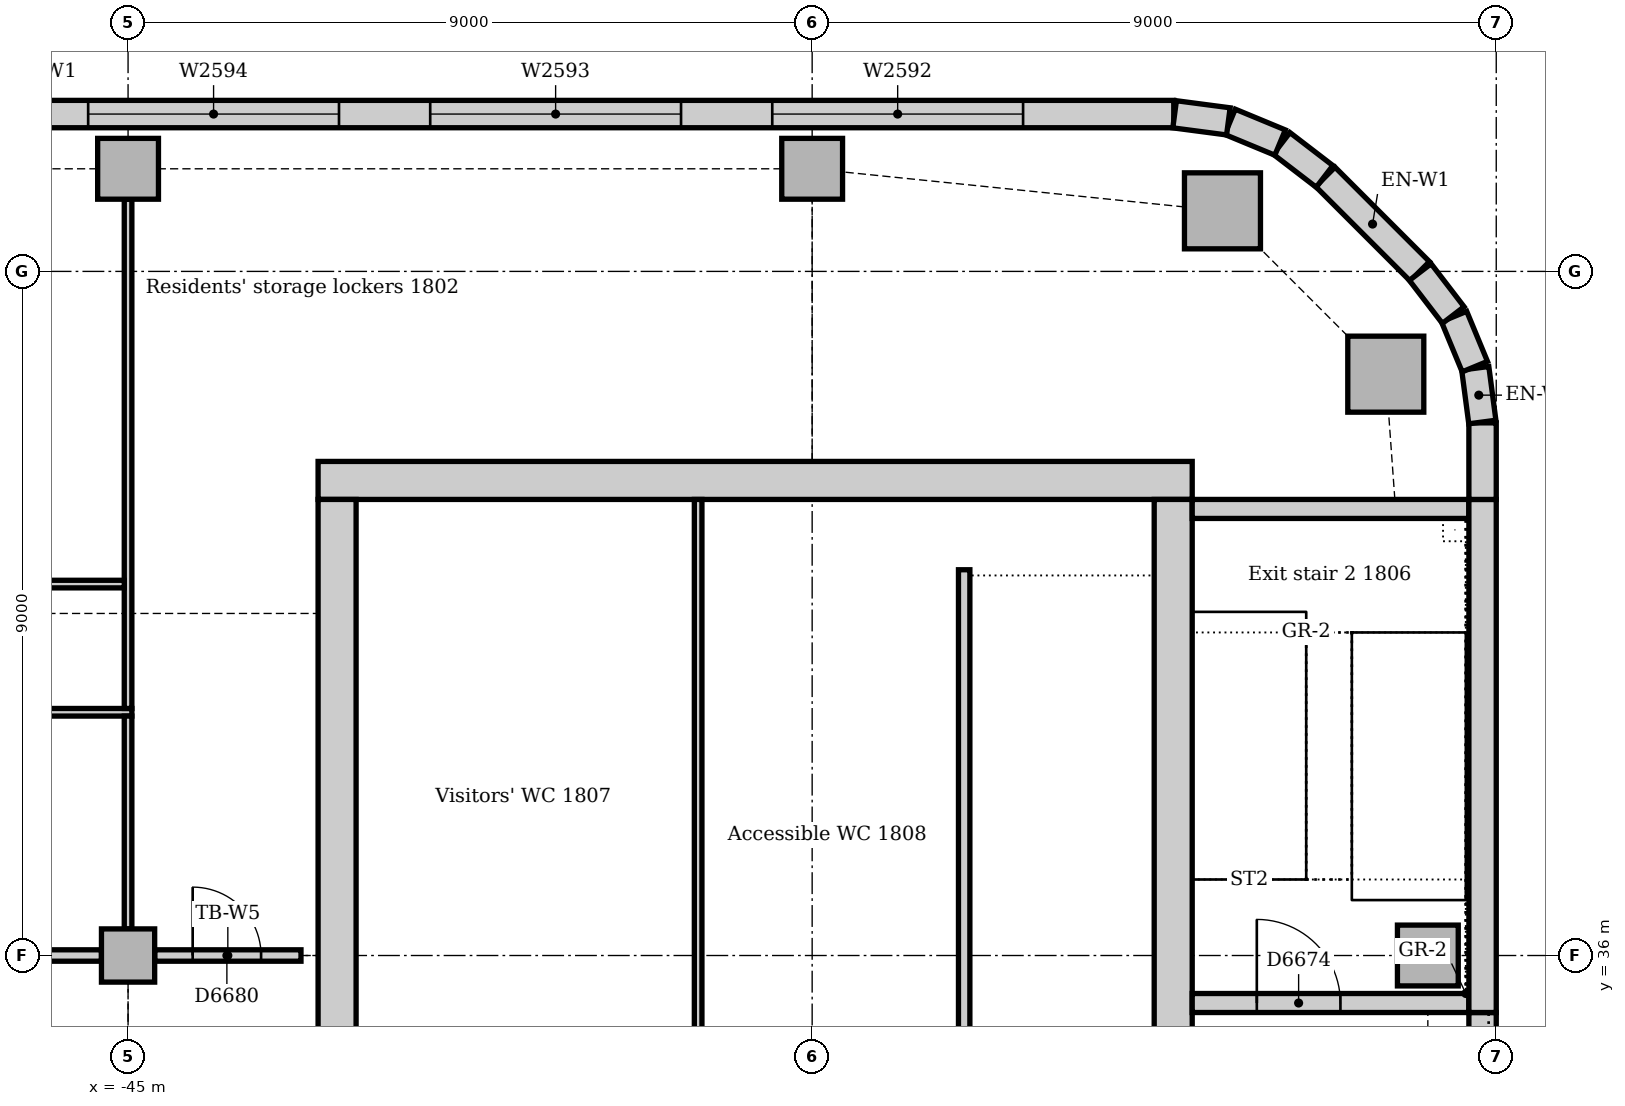
"""IFC4 building model, lengths in metres.
Left out: names, types, materials, properties, quantities, classifications, styles, units other than length and angle.
Written with IfcOpenShell. Run it as: python <this file> out.ifc"""

import sys

from ifc_helpers import new_model, si_unit, direction, frame, frame_2d, origin, origin_2d, place, context, subcontext, project, spatial, rectangle, extrude, element, fill, save


model = new_model("IFC4")
c1 = context("Model", 3, precision=1e-05, world=origin(), true_north=direction((0.0, 1.0)))
c2 = subcontext(c1, "Body", "Model", "MODEL_VIEW")
j1 = project(units=[si_unit("LENGTHUNIT", "METRE"), si_unit("PLANEANGLEUNIT", "RADIAN")], contexts=[c1])
p1 = place(None, origin())
s1 = spatial("IfcSite", under=j1, at=p1, CompositionType="ELEMENT")
p2 = place(p1, origin())
s2 = spatial("IfcBuilding", under=s1, at=p2, CompositionType="ELEMENT")
p3 = place(p2, frame((0.0, 0.0, 79.0)))
s3 = spatial("IfcBuildingStorey", under=s2, at=p3, CompositionType="ELEMENT", Elevation=79.0)
p4 = place(p3, frame((-31.0, 42.25, 0.0), z_axis=(0.0, 0.0, 1.0), x_axis=(-1.0, 0.0, 0.0)))
e1 = element("IfcWall", 1, at=p4, inside=s3, PredefinedType="SOLIDWALL", context=c2, shape_type="SweptSolid", body=[
    extrude(rectangle(XDim=11.5, YDim=0.5, at=frame_2d((5.75, 0.0))), origin(), (0.0, 0.0, 1.0), 4.0),
])
p5 = place(p3, frame((-31.25, 30.5, 0.0), z_axis=(0.0, 0.0, 1.0), x_axis=(0.0, 1.0, 0.0)))
e2 = element("IfcWall", 2, at=p5, inside=s3, PredefinedType="SOLIDWALL", context=c2, shape_type="SweptSolid", body=[
    extrude(rectangle(XDim=11.5, YDim=0.5, at=frame_2d((5.75, 0.0))), origin(), (0.0, 0.0, 1.0), 4.0),
])
p6 = place(p5, frame((0.85, 0.0, 0.0)))
e3 = element("IfcOpeningElement", 3, at=p6, cuts=e2, PredefinedType="OPENING", context=c2, shape_type="SweptSolid", body=[
    extrude(rectangle(XDim=1.8, YDim=2.1, at=frame_2d((0.9, 1.05))), frame((0.0, 0.26, 0.0), z_axis=(0.0, -1.0, 0.0), x_axis=(1.0, 0.0, 0.0)), (0.0, 0.0, 1.0), 0.52),
])
p7 = place(p3, frame((-42.25, 42.0, 0.0), z_axis=(0.0, 0.0, 1.0), x_axis=(0.0, -1.0, 0.0)))
e4 = element("IfcWall", 4, at=p7, inside=s3, PredefinedType="SOLIDWALL", context=c2, shape_type="SweptSolid", body=[
    extrude(rectangle(XDim=11.5, YDim=0.5, at=frame_2d((5.75, 0.0))), origin(), (0.0, 0.0, 1.0), 4.0),
])
p8 = place(p7, frame((8.85, 0.0, 0.0)))
e5 = element("IfcOpeningElement", 5, at=p8, cuts=e4, PredefinedType="OPENING", context=c2, shape_type="SweptSolid", body=[
    extrude(rectangle(XDim=1.8, YDim=2.1, at=frame_2d((0.9, 1.05))), frame((0.0, 0.26, 0.0), z_axis=(0.0, -1.0, 0.0), x_axis=(1.0, 0.0, 0.0)), (0.0, 0.0, 1.0), 0.52),
])
p9 = place(p3, frame((-31.0, 35.375, 0.0), z_axis=(0.0, 0.0, 1.0), x_axis=(1.0, 0.0, 0.0)))
e6 = element("IfcWall", 6, at=p9, inside=s3, PredefinedType="SOLIDWALL", context=c2, shape_type="SweptSolid", body=[
    extrude(rectangle(XDim=3.64, YDim=0.25, at=frame_2d((1.82, 0.0))), origin(), (0.0, 0.0, 1.0), 4.0),
])
p10 = place(p9, frame((0.85, 0.0, 0.0)))
e7 = element("IfcOpeningElement", 7, at=p10, cuts=e6, PredefinedType="OPENING", context=c2, shape_type="SweptSolid", body=[
    extrude(rectangle(XDim=1.1, YDim=2.1, at=frame_2d((0.55, 1.05))), frame((0.0, 0.135, 0.0), z_axis=(0.0, -1.0, 0.0), x_axis=(1.0, 0.0, 0.0)), (0.0, 0.0, 1.0), 0.27),
])
p11 = place(p3, frame((-27.36, 41.875, 0.0), z_axis=(0.0, 0.0, 1.0), x_axis=(-1.0, 0.0, 0.0)))
e8 = element("IfcWall", 8, at=p11, inside=s3, PredefinedType="SOLIDWALL", context=c2, shape_type="SweptSolid", body=[
    extrude(rectangle(XDim=3.64, YDim=0.25, at=frame_2d((1.82, 0.0))), origin(), (0.0, 0.0, 1.0), 4.0),
])
for number, where, z_axis, x_axis in (
    (9, (-28.453, 43.648, 0.0), (0.0, 0.0, 1.0), (1.0, 0.0, 0.0)),
    (10, (-30.602, 45.797, 0.0), (0.0, 0.0, 1.0), (1.0, 0.0, 0.0)),
):
    element("IfcColumn", number, at=place(p3, frame(where, z_axis=z_axis, x_axis=x_axis)), inside=s3, PredefinedType="COLUMN", context=c2, shape_type="SweptSolid", body=[
        extrude(rectangle(XDim=1.0, YDim=1.0, at=origin_2d()), origin(), (0.0, 0.0, 1.0), 3.85),
    ])
p12 = place(p3, frame((-27.9, 36.0, 0.0), z_axis=(0.0, 0.0, 1.0), x_axis=(1.0, 0.0, 0.0)))
e11 = element("IfcColumn", 11, at=p12, inside=s3, PredefinedType="COLUMN", context=c2, shape_type="SweptSolid", body=[
    extrude(rectangle(XDim=0.8, YDim=0.8, at=origin_2d()), origin(), (0.0, 0.0, 1.0), 4.0),
])
for number, where, z_axis, x_axis in (
    (12, (-45.0, 46.35, 0.0), (0.0, 0.0, 1.0), (1.0, 0.0, 0.0)),
    (13, (-36.0, 46.35, 0.0), (0.0, 0.0, 1.0), (1.0, 0.0, 0.0)),
):
    element("IfcColumn", number, at=place(p3, frame(where, z_axis=z_axis, x_axis=x_axis)), inside=s3, PredefinedType="COLUMN", context=c2, shape_type="SweptSolid", body=[
        extrude(rectangle(XDim=0.8, YDim=0.8, at=origin_2d()), origin(), (0.0, 0.0, 1.0), 3.85),
    ])
p13 = place(p3, frame((-45.0, 36.0, 0.0), z_axis=(0.0, 0.0, 1.0), x_axis=(1.0, 0.0, 0.0)))
e14 = element("IfcColumn", 14, at=p13, inside=s3, PredefinedType="COLUMN", context=c2, shape_type="SweptSolid", body=[
    extrude(rectangle(XDim=0.7, YDim=0.7, at=origin_2d()), origin(), (0.0, 0.0, 1.0), 3.85),
])
p14 = place(p3, frame((-27.18, 27.75, 0.0), z_axis=(0.0, 0.0, 1.0), x_axis=(0.0, 1.0, 0.0)))
e15 = element("IfcWall", 15, at=p14, inside=s3, PredefinedType="STANDARD", context=c2, shape_type="SweptSolid", body=[
    extrude(rectangle(XDim=7.5, YDim=0.36, at=frame_2d((3.75, 0.0))), origin(), (0.0, 0.0, 1.0), 3.85),
])
p15 = place(p14, frame((2.85, 0.0, 1.2)))
e16 = element("IfcOpeningElement", 16, at=p15, cuts=e15, PredefinedType="OPENING", context=c2, shape_type="SweptSolid", body=[
    extrude(rectangle(XDim=1.8, YDim=1.2, at=frame_2d((0.9, 0.6))), frame((0.0, 0.19, 0.0), z_axis=(0.0, -1.0, 0.0), x_axis=(1.0, 0.0, 0.0)), (0.0, 0.0, 1.0), 0.38),
])
p16 = place(p3, frame((-27.18, 35.25, 0.0), z_axis=(0.0, 0.0, 1.0), x_axis=(0.0, 1.0, 0.0)))
e17 = element("IfcWall", 17, at=p16, inside=s3, PredefinedType="STANDARD", context=c2, shape_type="SweptSolid", body=[
    extrude(rectangle(XDim=6.75, YDim=0.36, at=frame_2d((3.375, 0.0))), origin(), (0.0, 0.0, 1.0), 3.85),
])
p17 = place(p3, frame((-27.18, 42.0, 0.0), z_axis=(0.0, 0.0, 1.0), x_axis=(0.0, 1.0, 0.0)))
e18 = element("IfcWall", 18, at=p17, inside=s3, PredefinedType="STANDARD", context=c2, shape_type="SweptSolid", body=[
    extrude(rectangle(XDim=1.007, YDim=0.36, at=frame_2d((0.504, 0.0))), origin(), (0.0, 0.0, 1.0), 3.85),
])
p18 = place(p3, frame((-28.006, 45.001, 0.0), z_axis=(0.0, 0.0, 1.0), x_axis=(-0.707106781187, 0.707106781187, 0.0)))
e19 = element("IfcWall", 19, at=p18, inside=s3, PredefinedType="STANDARD", context=c2, shape_type="SweptSolid", body=[
    extrude(rectangle(XDim=1.757, YDim=0.36, at=frame_2d((0.879, 0.0))), origin(), (0.0, 0.0, 1.0), 3.85),
])
p19 = place(p3, frame((-31.243, 47.07, 0.0), z_axis=(0.0, 0.0, 1.0), x_axis=(-1.0, 0.0, 0.0)))
e20 = element("IfcWall", 20, at=p19, inside=s3, PredefinedType="STANDARD", context=c2, shape_type="SweptSolid", body=[
    extrude(rectangle(XDim=29.765, YDim=0.36, at=frame_2d((14.882, 0.0))), origin(), (0.0, 0.0, 1.0), 3.85),
])
p20 = place(p19, frame((1.982, 0.0, 0.9)))
e21 = element("IfcOpeningElement", 21, at=p20, cuts=e20, PredefinedType="OPENING", context=c2, shape_type="SweptSolid", body=[
    extrude(rectangle(XDim=3.3, YDim=1.6, at=frame_2d((1.65, 0.8))), frame((0.0, 0.19, 0.0), z_axis=(0.0, -1.0, 0.0), x_axis=(1.0, 0.0, 0.0)), (0.0, 0.0, 1.0), 0.38),
])
p21 = place(p19, frame((6.482, 0.0, 0.9)))
e22 = element("IfcOpeningElement", 22, at=p21, cuts=e20, PredefinedType="OPENING", context=c2, shape_type="SweptSolid", body=[
    extrude(rectangle(XDim=3.3, YDim=1.6, at=frame_2d((1.65, 0.8))), frame((0.0, 0.19, 0.0), z_axis=(0.0, -1.0, 0.0), x_axis=(1.0, 0.0, 0.0)), (0.0, 0.0, 1.0), 0.38),
])
p22 = place(p19, frame((10.982, 0.0, 0.9)))
e23 = element("IfcOpeningElement", 23, at=p22, cuts=e20, PredefinedType="OPENING", context=c2, shape_type="SweptSolid", body=[
    extrude(rectangle(XDim=3.3, YDim=1.6, at=frame_2d((1.65, 0.8))), frame((0.0, 0.19, 0.0), z_axis=(0.0, -1.0, 0.0), x_axis=(1.0, 0.0, 0.0)), (0.0, 0.0, 1.0), 0.38),
])
p23 = place(p19, frame((15.482, 0.0, 0.9)))
e24 = element("IfcOpeningElement", 24, at=p23, cuts=e20, PredefinedType="OPENING", context=c2, shape_type="SweptSolid", body=[
    extrude(rectangle(XDim=3.3, YDim=1.6, at=frame_2d((1.65, 0.8))), frame((0.0, 0.19, 0.0), z_axis=(0.0, -1.0, 0.0), x_axis=(1.0, 0.0, 0.0)), (0.0, 0.0, 1.0), 0.38),
])
p24 = place(p19, frame((19.982, 0.0, 0.9)))
e25 = element("IfcOpeningElement", 25, at=p24, cuts=e20, PredefinedType="OPENING", context=c2, shape_type="SweptSolid", body=[
    extrude(rectangle(XDim=3.3, YDim=1.6, at=frame_2d((1.65, 0.8))), frame((0.0, 0.19, 0.0), z_axis=(0.0, -1.0, 0.0), x_axis=(1.0, 0.0, 0.0)), (0.0, 0.0, 1.0), 0.38),
])
p25 = place(p19, frame((24.482, 0.0, 0.9)))
e26 = element("IfcOpeningElement", 26, at=p25, cuts=e20, PredefinedType="OPENING", context=c2, shape_type="SweptSolid", body=[
    extrude(rectangle(XDim=3.3, YDim=1.6, at=frame_2d((1.65, 0.8))), frame((0.0, 0.19, 0.0), z_axis=(0.0, -1.0, 0.0), x_axis=(1.0, 0.0, 0.0)), (0.0, 0.0, 1.0), 0.38),
])
for number, where, z_axis, x_axis in (
    (27, (-27.183, 43.019, 0.0), (0.0, 0.0, 1.0), (-0.131, 0.991, 0.0)),
    (28, (-27.282, 43.747, 0.0), (0.0, 0.0, 1.0), (-0.383, 0.924, 0.0)),
):
    element("IfcWall", number, at=place(p3, frame(where, z_axis=z_axis, x_axis=x_axis)), inside=s3, PredefinedType="STANDARD", context=c2, shape_type="SweptSolid", body=[
        extrude(rectangle(XDim=0.713, YDim=0.36, at=frame_2d((0.356, 0.0))), origin(), (0.0, 0.0, 1.0), 3.85),
    ])
for number, where, z_axis, x_axis in (
    (29, (-27.566, 44.425, 0.0), (0.0, 0.0, 1.0), (-0.609, 0.793, 0.0)),
    (30, (-29.259, 46.25, 0.0), (0.0, 0.0, 1.0), (-0.793, 0.609, 0.0)),
):
    element("IfcWall", number, at=place(p3, frame(where, z_axis=z_axis, x_axis=x_axis)), inside=s3, PredefinedType="STANDARD", context=c2, shape_type="SweptSolid", body=[
        extrude(rectangle(XDim=0.713, YDim=0.36, at=frame_2d((0.357, 0.0))), origin(), (0.0, 0.0, 1.0), 3.85),
    ])
for number, where, z_axis, x_axis in (
    (31, (-29.844, 46.695, 0.0), (0.0, 0.0, 1.0), (-0.924, 0.383, 0.0)),
    (32, (-30.524, 46.974, 0.0), (0.0, 0.0, 1.0), (-0.991, 0.131, 0.0)),
):
    element("IfcWall", number, at=place(p3, frame(where, z_axis=z_axis, x_axis=x_axis)), inside=s3, PredefinedType="STANDARD", context=c2, shape_type="SweptSolid", body=[
        extrude(rectangle(XDim=0.713, YDim=0.36, at=frame_2d((0.356, 0.0))), origin(), (0.0, 0.0, 1.0), 3.85),
    ])
p26 = place(p3, frame((-34.0, 41.075, 0.0), z_axis=(0.0, 0.0, 1.0), x_axis=(0.0, -1.0, 0.0)))
e33 = element("IfcWall", 33, at=p26, inside=s3, PredefinedType="SOLIDWALL", context=c2, shape_type="SweptSolid", body=[
    extrude(rectangle(XDim=7.0, YDim=0.15, at=frame_2d((3.5, 0.0))), origin(), (0.0, 0.0, 1.0), 4.0),
])
p27 = place(p3, frame((-37.5, 34.075, 0.0), z_axis=(0.0, 0.0, 1.0), x_axis=(0.0, 1.0, 0.0)))
e34 = element("IfcWall", 34, at=p27, inside=s3, PredefinedType="PARTITIONING", context=c2, shape_type="SweptSolid", body=[
    extrude(rectangle(XDim=7.925, YDim=0.1, at=frame_2d((3.962, 0.0))), origin(), (0.0, 0.0, 1.0), 3.85),
])
p28 = place(p3, frame((-44.65, 36.0, 0.0), z_axis=(0.0, 0.0, 1.0), x_axis=(1.0, 0.0, 0.0)))
e35 = element("IfcWall", 35, at=p28, inside=s3, PredefinedType="PARTITIONING", context=c2, shape_type="SweptSolid", body=[
    extrude(rectangle(XDim=1.925, YDim=0.15, at=frame_2d((0.963, 0.0))), origin(), (0.0, 0.0, 1.0), 3.602),
])
p29 = place(p28, frame((0.5, 0.0, 0.0)))
e36 = element("IfcOpeningElement", 36, at=p29, cuts=e35, PredefinedType="OPENING", context=c2, shape_type="SweptSolid", body=[
    extrude(rectangle(XDim=0.9, YDim=2.1, at=frame_2d((0.45, 1.05))), frame((0.0, 0.085, 0.0), z_axis=(0.0, -1.0, 0.0), x_axis=(1.0, 0.0, 0.0)), (0.0, 0.0, 1.0), 0.17),
])
p30 = place(p3, frame((-53.65, 36.0, 0.0), z_axis=(0.0, 0.0, 1.0), x_axis=(1.0, 0.0, 0.0)))
e37 = element("IfcWall", 37, at=p30, inside=s3, PredefinedType="PARTITIONING", context=c2, shape_type="SweptSolid", body=[
    extrude(rectangle(XDim=8.3, YDim=0.15, at=frame_2d((4.15, 0.0))), origin(), (0.0, 0.0, 1.0), 3.158),
])
p31 = place(p30, frame((2.055, 0.0, 0.0)))
e38 = element("IfcOpeningElement", 38, at=p31, cuts=e37, PredefinedType="OPENING", context=c2, shape_type="SweptSolid", body=[
    extrude(rectangle(XDim=1.0, YDim=2.1, at=frame_2d((0.5, 1.05))), frame((0.0, 0.085, 0.0), z_axis=(0.0, -1.0, 0.0), x_axis=(1.0, 0.0, 0.0)), (0.0, 0.0, 1.0), 0.17),
])
p32 = place(p3, frame((-55.425, 39.2, 0.0), z_axis=(0.0, 0.0, 1.0), x_axis=(1.0, 0.0, 0.0)))
e39 = element("IfcWall", 39, at=p32, inside=s3, PredefinedType="PARTITIONING", context=c2, shape_type="SweptSolid", body=[
    extrude(rectangle(XDim=10.475, YDim=0.1, at=frame_2d((5.237, 0.0))), origin(), (0.0, 0.0, 1.0), 3.85),
])
p33 = place(p32, frame((3.53, 0.0, 0.0)))
e40 = element("IfcOpeningElement", 40, at=p33, cuts=e39, PredefinedType="OPENING", context=c2, shape_type="SweptSolid", body=[
    extrude(rectangle(XDim=0.9, YDim=2.1, at=frame_2d((0.45, 1.05))), frame((0.0, 0.06, 0.0), z_axis=(0.0, -1.0, 0.0), x_axis=(1.0, 0.0, 0.0)), (0.0, 0.0, 1.0), 0.12),
])
p34 = place(p3, frame((-45.0, 39.25, 0.0), z_axis=(0.0, 0.0, 1.0), x_axis=(0.0, 1.0, 0.0)))
e41 = element("IfcWall", 41, at=p34, inside=s3, PredefinedType="PARTITIONING", context=c2, shape_type="SweptSolid", body=[
    extrude(rectangle(XDim=6.7, YDim=0.1, at=frame_2d((3.35, 0.0))), origin(), (0.0, 0.0, 1.0), 3.256),
])
p35 = place(p3, frame((-45.0, 36.35, 0.0), z_axis=(0.0, 0.0, 1.0), x_axis=(0.0, 1.0, 0.0)))
e42 = element("IfcWall", 42, at=p35, inside=s3, PredefinedType="PARTITIONING", context=c2, shape_type="SweptSolid", body=[
    extrude(rectangle(XDim=2.8, YDim=0.1, at=frame_2d((1.4, 0.0))), origin(), (0.0, 0.0, 1.0), 3.256),
])
p36 = place(p3, frame((-55.425, 40.886, 0.0), z_axis=(0.0, 0.0, 1.0), x_axis=(1.0, 0.0, 0.0)))
e43 = element("IfcWall", 43, at=p36, inside=s3, PredefinedType="PARTITIONING", context=c2, shape_type="SweptSolid", body=[
    extrude(rectangle(XDim=10.375, YDim=0.1, at=frame_2d((5.188, 0.0))), origin(), (0.0, 0.0, 1.0), 3.85),
])
p37 = place(p36, frame((2.0, 0.0, 0.0)))
e44 = element("IfcOpeningElement", 44, at=p37, cuts=e43, PredefinedType="OPENING", context=c2, shape_type="SweptSolid", body=[
    extrude(rectangle(XDim=0.9, YDim=2.1, at=frame_2d((0.45, 1.05))), frame((0.0, 0.06, 0.0), z_axis=(0.0, -1.0, 0.0), x_axis=(1.0, 0.0, 0.0)), (0.0, 0.0, 1.0), 0.12),
])
p38 = place(p36, frame((7.045, 0.0, 0.0)))
e45 = element("IfcOpeningElement", 45, at=p38, cuts=e43, PredefinedType="OPENING", context=c2, shape_type="SweptSolid", body=[
    extrude(rectangle(XDim=0.9, YDim=2.1, at=frame_2d((0.45, 1.05))), frame((0.0, 0.06, 0.0), z_axis=(0.0, -1.0, 0.0), x_axis=(1.0, 0.0, 0.0)), (0.0, 0.0, 1.0), 0.12),
])
p39 = place(p20, origin())
e46 = element("IfcWindow", 46, at=p39, inside=s3, PartitioningType="SINGLE_PANEL", PredefinedType="WINDOW", context=c2, shape_type="SweptSolid", body=[
    extrude(rectangle(XDim=3.3, YDim=1.6, at=frame_2d((1.65, 0.8))), frame((0.0, 0.13, 0.0), z_axis=(0.0, -1.0, 0.0), x_axis=(1.0, 0.0, 0.0)), (0.0, 0.0, 1.0), 0.06),
])
fill(e21, e46)
p40 = place(p21, origin())
e47 = element("IfcWindow", 47, at=p40, inside=s3, PartitioningType="SINGLE_PANEL", PredefinedType="WINDOW", context=c2, shape_type="SweptSolid", body=[
    extrude(rectangle(XDim=3.3, YDim=1.6, at=frame_2d((1.65, 0.8))), frame((0.0, 0.13, 0.0), z_axis=(0.0, -1.0, 0.0), x_axis=(1.0, 0.0, 0.0)), (0.0, 0.0, 1.0), 0.06),
])
fill(e22, e47)
p41 = place(p22, origin())
e48 = element("IfcWindow", 48, at=p41, inside=s3, PartitioningType="SINGLE_PANEL", PredefinedType="WINDOW", context=c2, shape_type="SweptSolid", body=[
    extrude(rectangle(XDim=3.3, YDim=1.6, at=frame_2d((1.65, 0.8))), frame((0.0, 0.13, 0.0), z_axis=(0.0, -1.0, 0.0), x_axis=(1.0, 0.0, 0.0)), (0.0, 0.0, 1.0), 0.06),
])
fill(e23, e48)
p42 = place(p10, origin())
e49 = element("IfcDoor", 49, at=p42, inside=s3, OperationType="SINGLE_SWING_LEFT", PredefinedType="DOOR", context=c2, shape_type="SweptSolid", body=[
    extrude(rectangle(XDim=1.1, YDim=2.1, at=frame_2d((0.55, 1.05))), frame((0.0, 0.025, 0.0), z_axis=(0.0, -1.0, 0.0), x_axis=(1.0, 0.0, 0.0)), (0.0, 0.0, 1.0), 0.05),
])
fill(e7, e49)
p43 = place(p29, origin())
e50 = element("IfcDoor", 50, at=p43, inside=s3, OperationType="SINGLE_SWING_LEFT", PredefinedType="DOOR", context=c2, shape_type="SweptSolid", body=[
    extrude(rectangle(XDim=0.9, YDim=2.1, at=frame_2d((0.45, 1.05))), frame((0.0, 0.025, 0.0), z_axis=(0.0, -1.0, 0.0), x_axis=(1.0, 0.0, 0.0)), (0.0, 0.0, 1.0), 0.05),
])
fill(e36, e50)
save(model, sys.argv[1])
